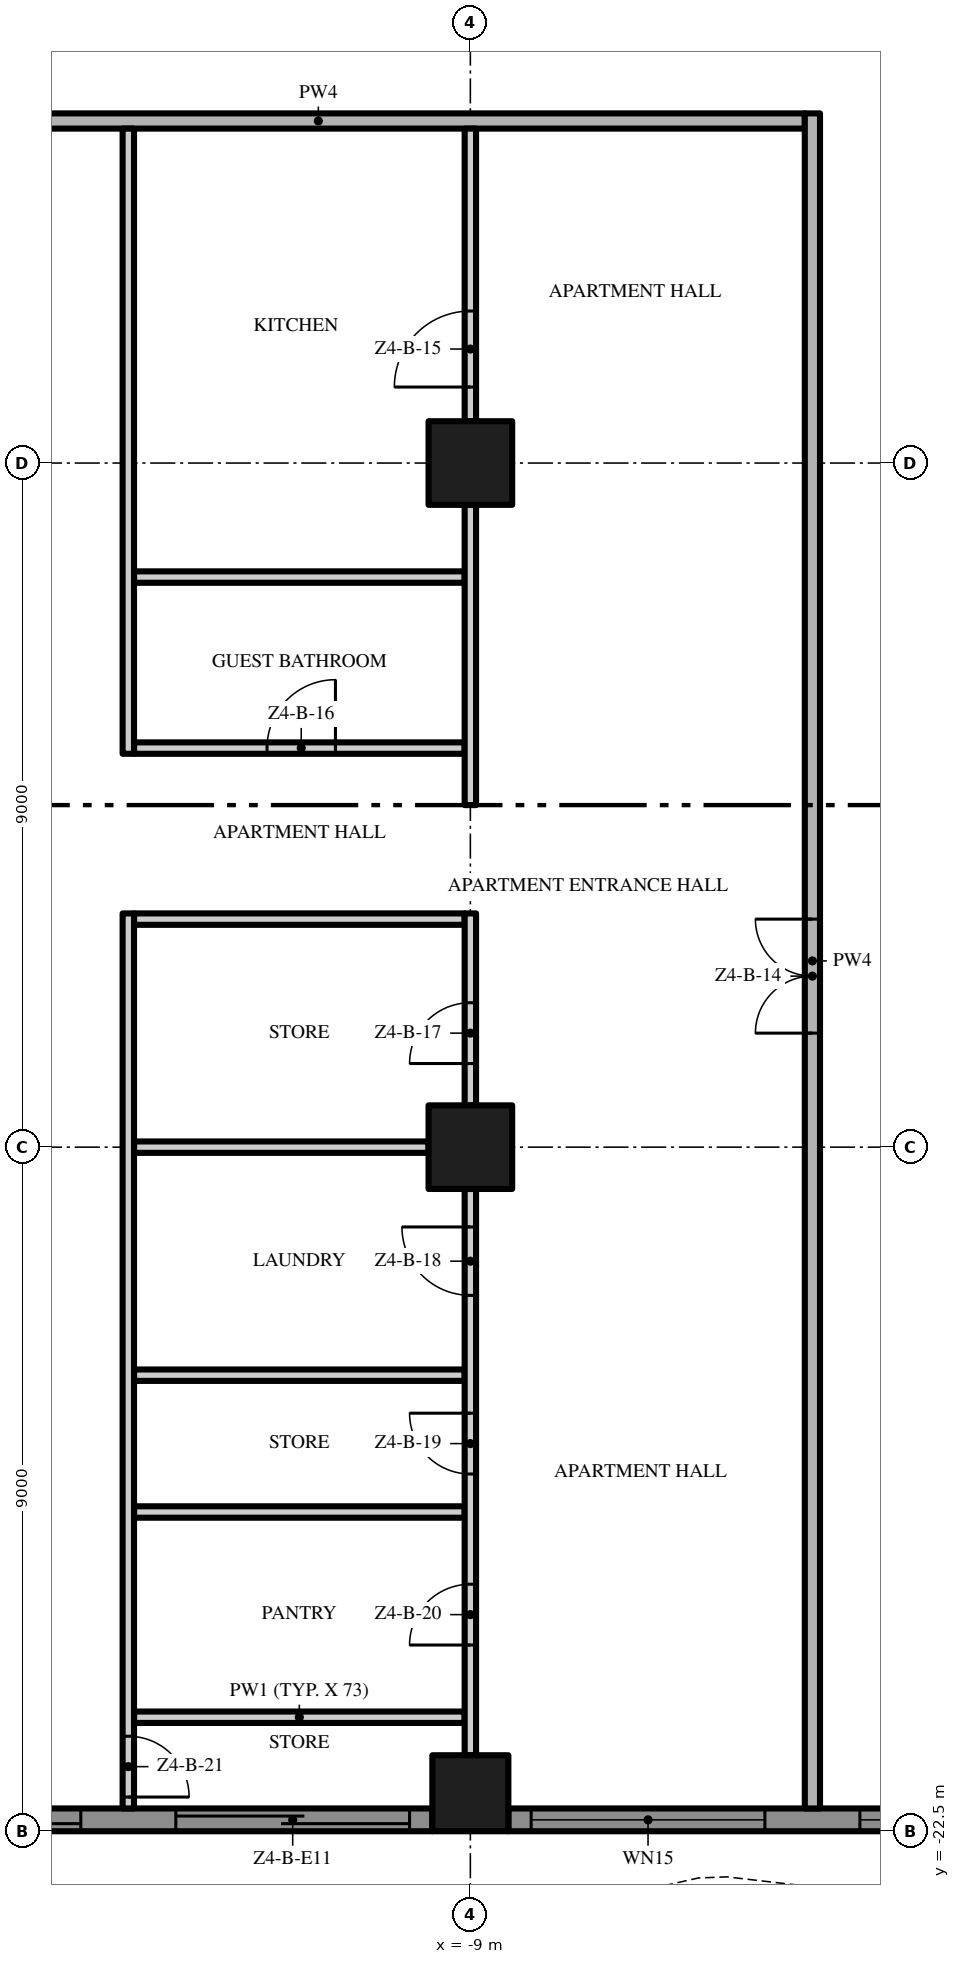
"""IFC4 building model, lengths in metres.
Left out: names, types, materials, properties, quantities, classifications, styles, units other than length and angle.
Written with IfcOpenShell. Run it as: python <this file> out.ifc"""

import sys

from ifc_helpers import new_model, si_unit, direction, frame, frame_2d, origin, origin_2d, place, context, subcontext, project, spatial, polyline, rectangle, outline, extrude, element, fill, save


model = new_model("IFC4")
c1 = context("Model", 3, precision=1e-05, world=origin(), true_north=direction((0.0, 1.0)))
c2 = subcontext(c1, "Body", "Model", "MODEL_VIEW")
j1 = project(units=[si_unit("LENGTHUNIT", "METRE"), si_unit("PLANEANGLEUNIT", "RADIAN")], contexts=[c1])
p1 = place(None, origin())
s1 = spatial("IfcSite", under=j1, at=p1, CompositionType="ELEMENT")
p2 = place(p1, origin())
s2 = spatial("IfcBuilding", under=s1, at=p2, CompositionType="ELEMENT")
p3 = place(p2, frame((0.0, 0.0, 199.6)))
s3 = spatial("IfcBuildingStorey", under=s2, at=p3, CompositionType="ELEMENT", Elevation=199.6)
p4 = place(p3, frame((-9.0, -13.5, 0.0), z_axis=(0.0, 0.0, 1.0), x_axis=(1.0, 0.0, 0.0)))
e1 = element("IfcColumn", 1, at=p4, inside=s3, PredefinedType="COLUMN", context=c2, shape_type="SweptSolid", body=[
    extrude(rectangle(XDim=1.1, YDim=1.1, at=origin_2d()), origin(), (0.0, 0.0, 1.0), 3.5),
])
p5 = place(p3, frame((-9.0, -22.0, 0.0), z_axis=(0.0, 0.0, 1.0), x_axis=(1.0, 0.0, 0.0)))
e2 = element("IfcColumn", 2, at=p5, inside=s3, PredefinedType="COLUMN", context=c2, shape_type="SweptSolid", body=[
    extrude(rectangle(XDim=1.0, YDim=1.0, at=origin_2d()), origin(), (0.0, 0.0, 1.0), 3.5),
])
p6 = place(p3, frame((-9.0, -4.5, 0.0), z_axis=(0.0, 0.0, 1.0), x_axis=(1.0, 0.0, 0.0)))
e3 = element("IfcColumn", 3, at=p6, inside=s3, PredefinedType="COLUMN", context=c2, shape_type="SweptSolid", body=[
    extrude(rectangle(XDim=1.1, YDim=1.1, at=origin_2d()), origin(), (0.0, 0.0, 1.0), 3.5),
])
p7 = place(p3, frame((-9.5, -22.35, 0.0), z_axis=(0.0, 0.0, 1.0), x_axis=(-1.0, 0.0, 0.0)))
e4 = element("IfcWall", 4, at=p7, inside=s3, PredefinedType="SOLIDWALL", context=c2, shape_type="SweptSolid", body=[
    extrude(rectangle(XDim=8.0, YDim=0.3, at=frame_2d((4.0, 0.0))), origin(), (0.0, 0.0, 1.0), 3.5),
])
p8 = place(p7, frame((4.625, 0.0, 0.0)))
e5 = element("IfcOpeningElement", 5, at=p8, cuts=e4, PredefinedType="OPENING", context=c2, shape_type="SweptSolid", body=[
    extrude(rectangle(XDim=3.075, YDim=2.4, at=frame_2d((1.538, 1.2))), frame((0.0, 0.16, 0.0), z_axis=(0.0, -1.0, 0.0), x_axis=(1.0, 0.0, 0.0)), (0.0, 0.0, 1.0), 0.32),
])
p9 = place(p7, frame((0.3, 0.0, 0.0)))
e6 = element("IfcOpeningElement", 6, at=p9, cuts=e4, PredefinedType="OPENING", context=c2, shape_type="SweptSolid", body=[
    extrude(rectangle(XDim=3.075, YDim=2.4, at=frame_2d((1.538, 1.2))), frame((0.0, 0.16, 0.0), z_axis=(0.0, -1.0, 0.0), x_axis=(1.0, 0.0, 0.0)), (0.0, 0.0, 1.0), 0.32),
])
p10 = place(p3, frame((-0.5, -22.35, 0.0), z_axis=(0.0, 0.0, 1.0), x_axis=(-1.0, 0.0, 0.0)))
e7 = element("IfcWall", 7, at=p10, inside=s3, PredefinedType="SOLIDWALL", context=c2, shape_type="SweptSolid", body=[
    extrude(rectangle(XDim=8.0, YDim=0.3, at=frame_2d((4.0, 0.0))), origin(), (0.0, 0.0, 1.0), 3.5),
])
p11 = place(p10, frame((4.625, 0.0, 0.45)))
e8 = element("IfcOpeningElement", 8, at=p11, cuts=e7, PredefinedType="OPENING", context=c2, shape_type="SweptSolid", body=[
    extrude(rectangle(XDim=3.075, YDim=2.65, at=frame_2d((1.538, 1.325))), frame((0.0, 0.16, 0.0), z_axis=(0.0, -1.0, 0.0), x_axis=(1.0, 0.0, 0.0)), (0.0, 0.0, 1.0), 0.32),
])
p12 = place(p10, frame((0.3, 0.0, 0.45)))
e9 = element("IfcOpeningElement", 9, at=p12, cuts=e7, PredefinedType="OPENING", context=c2, shape_type="SweptSolid", body=[
    extrude(rectangle(XDim=3.075, YDim=2.65, at=frame_2d((1.538, 1.325))), frame((0.0, 0.16, 0.0), z_axis=(0.0, -1.0, 0.0), x_axis=(1.0, 0.0, 0.0)), (0.0, 0.0, 1.0), 0.32),
])
p13 = place(p3, origin())
e10 = element("IfcWall", 10, at=p13, inside=s3, PredefinedType="USERDEFINED", context=c2, shape_type="SweptSolid", body=[
    extrude(outline(polyline([(-22.5, -23.451), (-21.0, -23.115), (-20.625, -23.1), (-19.5, -23.231), (-18.0, -23.755), (-16.5, -24.488), (-15.0, -25.149), (-13.5, -25.485), (-13.125, -25.5), (-12.0, -25.369), (-10.5, -24.845), (-9.0, -24.112), (-7.5, -23.451), (-6.0, -23.115), (-5.625, -23.1), (-4.5, -23.231), (-3.0, -23.755), (-1.5, -24.488), (0.0, -25.149), (1.5, -25.485), (1.875, -25.5), (3.0, -25.369), (4.5, -24.845), (6.0, -24.112), (7.5, -23.451), (9.0, -23.115), (9.375, -23.1), (10.5, -23.231), (12.0, -23.755), (13.5, -24.488), (15.0, -25.149), (16.5, -25.485), (16.875, -25.5), (18.0, -25.369), (19.5, -24.845), (21.0, -24.112), (22.5, -23.451), (22.399, -23.223), (20.895, -23.885), (19.404, -24.614), (17.944, -25.124), (16.865, -25.249), (16.533, -25.236), (15.079, -24.91), (13.605, -24.261), (12.096, -23.524), (10.556, -22.986), (9.385, -22.849), (8.967, -22.866), (7.421, -23.213), (5.895, -23.885), (4.404, -24.614), (2.944, -25.124), (1.865, -25.249), (1.533, -25.236), (0.079, -24.91), (-1.395, -24.261), (-2.904, -23.524), (-4.444, -22.986), (-5.615, -22.849), (-6.033, -22.866), (-7.579, -23.213), (-9.105, -23.885), (-10.596, -24.614), (-12.056, -25.124), (-13.135, -25.249), (-13.467, -25.236), (-14.921, -24.91), (-16.395, -24.261), (-17.904, -23.524), (-19.444, -22.986), (-20.615, -22.849), (-21.033, -22.866), (-22.555, -23.208), (-22.5, -23.451)])), origin(), (0.0, 0.0, 1.0), 0.9),
])
for number, where, z_axis, x_axis in (
    (11, (-13.425, -21.0, 0.0), (0.0, 0.0, 1.0), (1.0, 0.0, 0.0)),
    (12, (-13.425, -18.3, 0.0), (0.0, 0.0, 1.0), (1.0, 0.0, 0.0)),
    (13, (-13.425, -16.5, 0.0), (0.0, 0.0, 1.0), (1.0, 0.0, 0.0)),
):
    element("IfcWall", number, at=place(p3, frame(where, z_axis=z_axis, x_axis=x_axis)), inside=s3, PredefinedType="PARTITIONING", context=c2, shape_type="SweptSolid", body=[
        extrude(rectangle(XDim=4.35, YDim=0.15, at=frame_2d((2.175, 0.0))), origin(), (0.0, 0.0, 1.0), 3.5),
    ])
p14 = place(p3, frame((-13.425, -13.5, 0.0), z_axis=(0.0, 0.0, 1.0), x_axis=(1.0, 0.0, 0.0)))
e14 = element("IfcWall", 14, at=p14, inside=s3, PredefinedType="PARTITIONING", context=c2, shape_type="SweptSolid", body=[
    extrude(rectangle(XDim=3.875, YDim=0.15, at=frame_2d((1.938, 0.0))), origin(), (0.0, 0.0, 1.0), 3.5),
])
p15 = place(p3, frame((-13.425, -10.5, 0.0), z_axis=(0.0, 0.0, 1.0), x_axis=(1.0, 0.0, 0.0)))
e15 = element("IfcWall", 15, at=p15, inside=s3, PredefinedType="PARTITIONING", context=c2, shape_type="SweptSolid", body=[
    extrude(rectangle(XDim=4.35, YDim=0.15, at=frame_2d((2.175, 0.0))), origin(), (0.0, 0.0, 1.0), 3.5),
])
p16 = place(p3, frame((-13.425, -8.25, 0.0), z_axis=(0.0, 0.0, 1.0), x_axis=(1.0, 0.0, 0.0)))
e16 = element("IfcWall", 16, at=p16, inside=s3, PredefinedType="PARTITIONING", context=c2, shape_type="SweptSolid", body=[
    extrude(rectangle(XDim=4.35, YDim=0.15, at=frame_2d((2.175, 0.0))), origin(), (0.0, 0.0, 1.0), 3.5),
])
p17 = place(p16, frame((1.75, 0.0, 0.0)))
e17 = element("IfcOpeningElement", 17, at=p17, cuts=e16, PredefinedType="OPENING", context=c2, shape_type="SweptSolid", body=[
    extrude(rectangle(XDim=0.9, YDim=2.1, at=frame_2d((0.45, 1.05))), frame((0.0, 0.085, 0.0), z_axis=(0.0, -1.0, 0.0), x_axis=(1.0, 0.0, 0.0)), (0.0, 0.0, 1.0), 0.17),
])
p18 = place(p3, frame((-13.425, -6.0, 0.0), z_axis=(0.0, 0.0, 1.0), x_axis=(1.0, 0.0, 0.0)))
e18 = element("IfcWall", 18, at=p18, inside=s3, PredefinedType="PARTITIONING", context=c2, shape_type="SweptSolid", body=[
    extrude(rectangle(XDim=4.35, YDim=0.15, at=frame_2d((2.175, 0.0))), origin(), (0.0, 0.0, 1.0), 3.5),
])
p19 = place(p3, frame((-17.4, 0.0, 0.0), z_axis=(0.0, 0.0, 1.0), x_axis=(1.0, 0.0, 0.0)))
e19 = element("IfcWall", 19, at=p19, inside=s3, PredefinedType="PARTITIONING", context=c2, shape_type="SweptSolid", body=[
    extrude(rectangle(XDim=12.8, YDim=0.2, at=frame_2d((6.4, 0.0))), origin(), (0.0, 0.0, 1.0), 3.5),
])
p20 = place(p3, frame((-13.5, -10.425, 0.0), z_axis=(0.0, 0.0, 1.0), x_axis=(0.0, -1.0, 0.0)))
e20 = element("IfcWall", 20, at=p20, inside=s3, PredefinedType="PARTITIONING", context=c2, shape_type="SweptSolid", body=[
    extrude(rectangle(XDim=11.775, YDim=0.15, at=frame_2d((5.888, 0.0))), origin(), (0.0, 0.0, 1.0), 3.5),
])
p21 = place(p20, frame((10.825, 0.0, 0.0)))
e21 = element("IfcOpeningElement", 21, at=p21, cuts=e20, PredefinedType="OPENING", context=c2, shape_type="SweptSolid", body=[
    extrude(rectangle(XDim=0.8, YDim=2.0, at=frame_2d((0.4, 1.0))), frame((0.0, 0.085, 0.0), z_axis=(0.0, -1.0, 0.0), x_axis=(1.0, 0.0, 0.0)), (0.0, 0.0, 1.0), 0.17),
])
p22 = place(p3, frame((-13.5, -8.325, 0.0), z_axis=(0.0, 0.0, 1.0), x_axis=(0.0, 1.0, 0.0)))
e22 = element("IfcWall", 22, at=p22, inside=s3, PredefinedType="PARTITIONING", context=c2, shape_type="SweptSolid", body=[
    extrude(rectangle(XDim=8.225, YDim=0.15, at=frame_2d((4.112, 0.0))), origin(), (0.0, 0.0, 1.0), 3.5),
])
p23 = place(p3, frame((-9.0, -21.5, 0.0), z_axis=(0.0, 0.0, 1.0), x_axis=(0.0, 1.0, 0.0)))
e23 = element("IfcWall", 23, at=p23, inside=s3, PredefinedType="PARTITIONING", context=c2, shape_type="SweptSolid", body=[
    extrude(rectangle(XDim=7.45, YDim=0.15, at=frame_2d((3.725, 0.0))), origin(), (0.0, 0.0, 1.0), 3.5),
])
p24 = place(p23, frame((6.05, 0.0, 0.0)))
e24 = element("IfcOpeningElement", 24, at=p24, cuts=e23, PredefinedType="OPENING", context=c2, shape_type="SweptSolid", body=[
    extrude(rectangle(XDim=0.9, YDim=2.1, at=frame_2d((0.45, 1.05))), frame((0.0, 0.085, 0.0), z_axis=(0.0, -1.0, 0.0), x_axis=(1.0, 0.0, 0.0)), (0.0, 0.0, 1.0), 0.17),
])
p25 = place(p23, frame((3.7, 0.0, 0.0)))
e25 = element("IfcOpeningElement", 25, at=p25, cuts=e23, PredefinedType="OPENING", context=c2, shape_type="SweptSolid", body=[
    extrude(rectangle(XDim=0.8, YDim=2.0, at=frame_2d((0.4, 1.0))), frame((0.0, 0.085, 0.0), z_axis=(0.0, -1.0, 0.0), x_axis=(1.0, 0.0, 0.0)), (0.0, 0.0, 1.0), 0.17),
])
p26 = place(p23, frame((1.45, 0.0, 0.0)))
e26 = element("IfcOpeningElement", 26, at=p26, cuts=e23, PredefinedType="OPENING", context=c2, shape_type="SweptSolid", body=[
    extrude(rectangle(XDim=0.8, YDim=2.0, at=frame_2d((0.4, 1.0))), frame((0.0, 0.085, 0.0), z_axis=(0.0, -1.0, 0.0), x_axis=(1.0, 0.0, 0.0)), (0.0, 0.0, 1.0), 0.17),
])
p27 = place(p3, frame((-9.0, -12.95, 0.0), z_axis=(0.0, 0.0, 1.0), x_axis=(0.0, 1.0, 0.0)))
e27 = element("IfcWall", 27, at=p27, inside=s3, PredefinedType="PARTITIONING", context=c2, shape_type="SweptSolid", body=[
    extrude(rectangle(XDim=2.525, YDim=0.15, at=frame_2d((1.262, 0.0))), origin(), (0.0, 0.0, 1.0), 3.5),
])
p28 = place(p27, frame((0.55, 0.0, 0.0)))
e28 = element("IfcOpeningElement", 28, at=p28, cuts=e27, PredefinedType="OPENING", context=c2, shape_type="SweptSolid", body=[
    extrude(rectangle(XDim=0.8, YDim=2.0, at=frame_2d((0.4, 1.0))), frame((0.0, 0.085, 0.0), z_axis=(0.0, -1.0, 0.0), x_axis=(1.0, 0.0, 0.0)), (0.0, 0.0, 1.0), 0.17),
])
p29 = place(p3, frame((-9.0, -9.0, 0.0), z_axis=(0.0, 0.0, 1.0), x_axis=(0.0, 1.0, 0.0)))
e29 = element("IfcWall", 29, at=p29, inside=s3, PredefinedType="PARTITIONING", context=c2, shape_type="SweptSolid", body=[
    extrude(rectangle(XDim=3.95, YDim=0.15, at=frame_2d((1.975, 0.0))), origin(), (0.0, 0.0, 1.0), 3.5),
])
p30 = place(p3, frame((-9.0, -3.95, 0.0), z_axis=(0.0, 0.0, 1.0), x_axis=(0.0, 1.0, 0.0)))
e30 = element("IfcWall", 30, at=p30, inside=s3, PredefinedType="PARTITIONING", context=c2, shape_type="SweptSolid", body=[
    extrude(rectangle(XDim=3.85, YDim=0.15, at=frame_2d((1.925, 0.0))), origin(), (0.0, 0.0, 1.0), 3.5),
])
p31 = place(p30, frame((0.45, 0.0, 0.0)))
e31 = element("IfcOpeningElement", 31, at=p31, cuts=e30, PredefinedType="OPENING", context=c2, shape_type="SweptSolid", body=[
    extrude(rectangle(XDim=1.0, YDim=2.4, at=frame_2d((0.5, 1.2))), frame((0.0, 0.085, 0.0), z_axis=(0.0, -1.0, 0.0), x_axis=(1.0, 0.0, 0.0)), (0.0, 0.0, 1.0), 0.17),
])
p32 = place(p3, frame((-4.5, -22.2, 0.0), z_axis=(0.0, 0.0, 1.0), x_axis=(0.0, 1.0, 0.0)))
e32 = element("IfcWall", 32, at=p32, inside=s3, PredefinedType="PARTITIONING", context=c2, shape_type="SweptSolid", body=[
    extrude(rectangle(XDim=22.3, YDim=0.2, at=frame_2d((11.15, 0.0))), origin(), (0.0, 0.0, 1.0), 3.5),
])
p33 = place(p32, frame((10.2, 0.0, 0.0)))
e33 = element("IfcOpeningElement", 33, at=p33, cuts=e32, PredefinedType="OPENING", context=c2, shape_type="SweptSolid", body=[
    extrude(rectangle(XDim=1.5, YDim=2.4, at=frame_2d((0.75, 1.2))), frame((0.0, 0.11, 0.0), z_axis=(0.0, -1.0, 0.0), x_axis=(1.0, 0.0, 0.0)), (0.0, 0.0, 1.0), 0.22),
])
p34 = place(p8, origin())
e34 = element("IfcDoor", 34, at=p34, inside=s3, OperationType="SINGLE_SWING_LEFT", PredefinedType="DOOR", context=c2, shape_type="SweptSolid", body=[
    extrude(rectangle(XDim=3.075, YDim=2.4, at=frame_2d((1.538, 1.2))), frame((0.0, 0.025, 0.0), z_axis=(0.0, -1.0, 0.0), x_axis=(1.0, 0.0, 0.0)), (0.0, 0.0, 1.0), 0.05),
])
fill(e5, e34)
p35 = place(p9, origin())
e35 = element("IfcDoor", 35, at=p35, inside=s3, OperationType="SINGLE_SWING_LEFT", PredefinedType="DOOR", context=c2, shape_type="SweptSolid", body=[
    extrude(rectangle(XDim=3.075, YDim=2.4, at=frame_2d((1.538, 1.2))), frame((0.0, 0.025, 0.0), z_axis=(0.0, -1.0, 0.0), x_axis=(1.0, 0.0, 0.0)), (0.0, 0.0, 1.0), 0.05),
])
fill(e6, e35)
p36 = place(p11, origin())
e36 = element("IfcWindow", 36, at=p36, inside=s3, PartitioningType="SINGLE_PANEL", PredefinedType="WINDOW", context=c2, shape_type="SweptSolid", body=[
    extrude(rectangle(XDim=3.075, YDim=2.65, at=frame_2d((1.538, 1.325))), frame((0.0, 0.03, 0.0), z_axis=(0.0, -1.0, 0.0), x_axis=(1.0, 0.0, 0.0)), (0.0, 0.0, 1.0), 0.06),
])
fill(e8, e36)
p37 = place(p12, origin())
e37 = element("IfcWindow", 37, at=p37, inside=s3, PartitioningType="SINGLE_PANEL", PredefinedType="WINDOW", context=c2, shape_type="SweptSolid", body=[
    extrude(rectangle(XDim=3.075, YDim=2.65, at=frame_2d((1.538, 1.325))), frame((0.0, 0.03, 0.0), z_axis=(0.0, -1.0, 0.0), x_axis=(1.0, 0.0, 0.0)), (0.0, 0.0, 1.0), 0.06),
])
fill(e9, e37)
p38 = place(p33, origin())
e38 = element("IfcDoor", 38, at=p38, inside=s3, OperationType="DOUBLE_DOOR_SINGLE_SWING", PredefinedType="DOOR", context=c2, shape_type="SweptSolid", body=[
    extrude(rectangle(XDim=1.5, YDim=2.4, at=frame_2d((0.75, 1.2))), frame((0.0, 0.025, 0.0), z_axis=(0.0, -1.0, 0.0), x_axis=(1.0, 0.0, 0.0)), (0.0, 0.0, 1.0), 0.05),
])
fill(e33, e38)
p39 = place(p31, origin())
e39 = element("IfcDoor", 39, at=p39, inside=s3, OperationType="SINGLE_SWING_LEFT", PredefinedType="DOOR", context=c2, shape_type="SweptSolid", body=[
    extrude(rectangle(XDim=1.0, YDim=2.4, at=frame_2d((0.5, 1.2))), frame((0.0, 0.025, 0.0), z_axis=(0.0, -1.0, 0.0), x_axis=(1.0, 0.0, 0.0)), (0.0, 0.0, 1.0), 0.05),
])
fill(e31, e39)
p40 = place(p17, origin())
e40 = element("IfcDoor", 40, at=p40, inside=s3, OperationType="SINGLE_SWING_RIGHT", PredefinedType="DOOR", context=c2, shape_type="SweptSolid", body=[
    extrude(rectangle(XDim=0.9, YDim=2.1, at=frame_2d((0.45, 1.05))), frame((0.0, 0.025, 0.0), z_axis=(0.0, -1.0, 0.0), x_axis=(1.0, 0.0, 0.0)), (0.0, 0.0, 1.0), 0.05),
])
fill(e17, e40)
p41 = place(p28, origin())
e41 = element("IfcDoor", 41, at=p41, inside=s3, OperationType="SINGLE_SWING_LEFT", PredefinedType="DOOR", context=c2, shape_type="SweptSolid", body=[
    extrude(rectangle(XDim=0.8, YDim=2.0, at=frame_2d((0.4, 1.0))), frame((0.0, 0.025, 0.0), z_axis=(0.0, -1.0, 0.0), x_axis=(1.0, 0.0, 0.0)), (0.0, 0.0, 1.0), 0.05),
])
fill(e28, e41)
p42 = place(p24, origin())
e42 = element("IfcDoor", 42, at=p42, inside=s3, OperationType="SINGLE_SWING_RIGHT", PredefinedType="DOOR", context=c2, shape_type="SweptSolid", body=[
    extrude(rectangle(XDim=0.9, YDim=2.1, at=frame_2d((0.45, 1.05))), frame((0.0, 0.025, 0.0), z_axis=(0.0, -1.0, 0.0), x_axis=(1.0, 0.0, 0.0)), (0.0, 0.0, 1.0), 0.05),
])
fill(e24, e42)
p43 = place(p25, origin())
e43 = element("IfcDoor", 43, at=p43, inside=s3, OperationType="SINGLE_SWING_RIGHT", PredefinedType="DOOR", context=c2, shape_type="SweptSolid", body=[
    extrude(rectangle(XDim=0.8, YDim=2.0, at=frame_2d((0.4, 1.0))), frame((0.0, 0.025, 0.0), z_axis=(0.0, -1.0, 0.0), x_axis=(1.0, 0.0, 0.0)), (0.0, 0.0, 1.0), 0.05),
])
fill(e25, e43)
p44 = place(p26, origin())
e44 = element("IfcDoor", 44, at=p44, inside=s3, OperationType="SINGLE_SWING_LEFT", PredefinedType="DOOR", context=c2, shape_type="SweptSolid", body=[
    extrude(rectangle(XDim=0.8, YDim=2.0, at=frame_2d((0.4, 1.0))), frame((0.0, 0.025, 0.0), z_axis=(0.0, -1.0, 0.0), x_axis=(1.0, 0.0, 0.0)), (0.0, 0.0, 1.0), 0.05),
])
fill(e26, e44)
p45 = place(p21, origin())
e45 = element("IfcDoor", 45, at=p45, inside=s3, OperationType="SINGLE_SWING_RIGHT", PredefinedType="DOOR", context=c2, shape_type="SweptSolid", body=[
    extrude(rectangle(XDim=0.8, YDim=2.0, at=frame_2d((0.4, 1.0))), frame((0.0, 0.025, 0.0), z_axis=(0.0, -1.0, 0.0), x_axis=(1.0, 0.0, 0.0)), (0.0, 0.0, 1.0), 0.05),
])
fill(e21, e45)
save(model, sys.argv[1])
